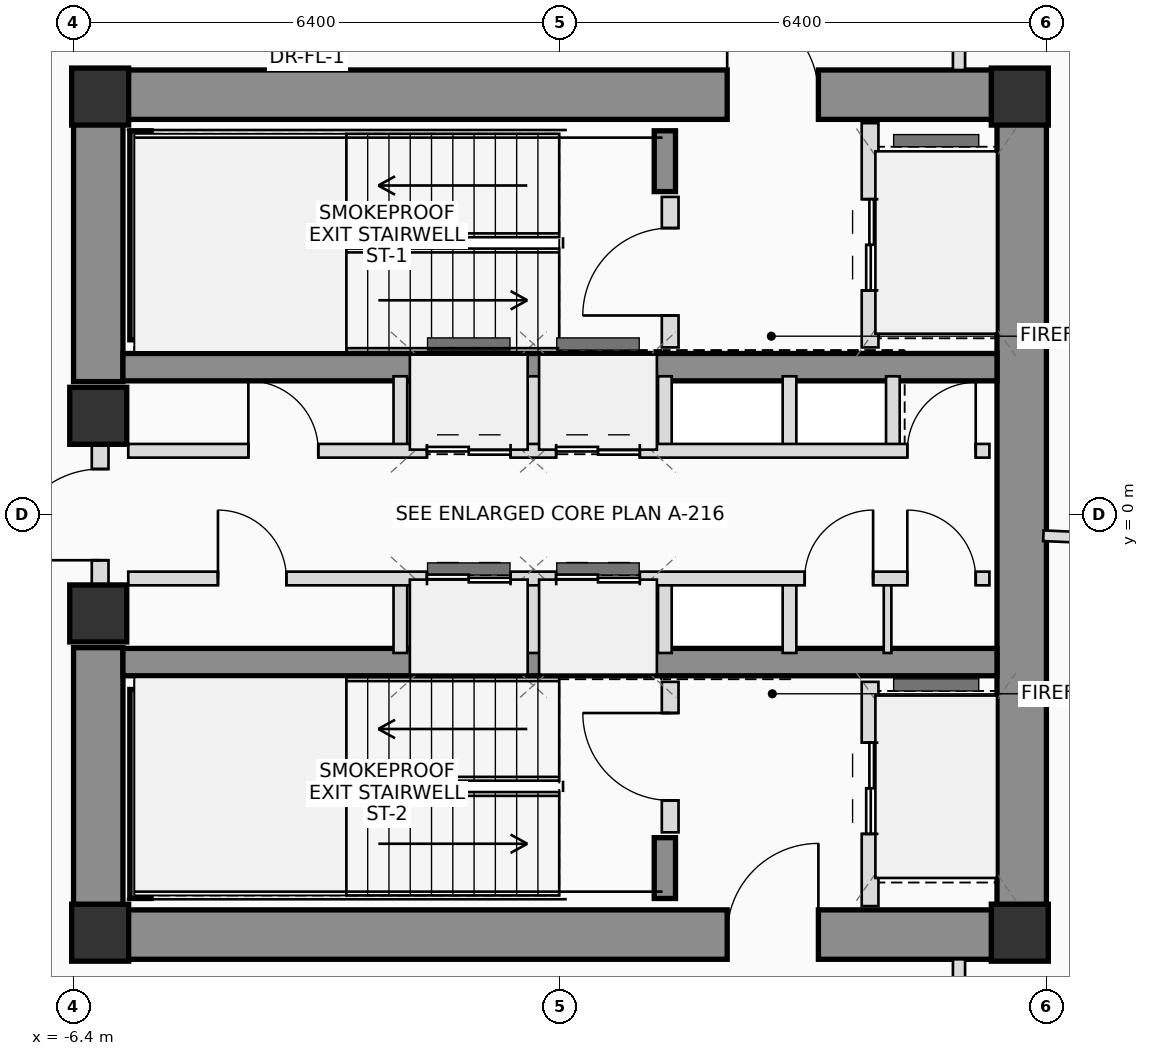
"""IFC4 building model, lengths in metres.
Left out: names, types, materials, properties, quantities, classifications, styles, units other than length and angle.
Written with IfcOpenShell. Run it as: python <this file> out.ifc"""

import sys

from ifc_helpers import new_model, si_unit, direction, frame, frame_2d, origin, origin_2d, place, context, subcontext, project, spatial, rectangle, extrude, source, transform, mapped, element, fill, save


model = new_model("IFC4")
c1 = context("Model", 3, precision=1e-05, world=origin(), true_north=direction((0.0, 1.0)))
c2 = subcontext(c1, "Body", "Model", "MODEL_VIEW")
j1 = project(units=[si_unit("LENGTHUNIT", "METRE"), si_unit("PLANEANGLEUNIT", "RADIAN")], contexts=[c1])
p1 = place(None, origin())
s1 = spatial("IfcSite", under=j1, at=p1, CompositionType="ELEMENT")
p2 = place(p1, origin())
s2 = spatial("IfcBuilding", under=s1, at=p2, CompositionType="ELEMENT")
p3 = place(p2, frame((0.0, 0.0, 176.0)))
s3 = spatial("IfcBuildingStorey", under=s2, at=p3, CompositionType="ELEMENT", Elevation=176.0)
m1 = source(origin(), c2, "Body", "SweptSolid", [
    extrude(rectangle(XDim=0.75, YDim=0.75, at=origin_2d()), origin(), (0.0, 0.0, 1.0), 3.45),
])
for number, where, z_axis, x_axis in (
    (1, (-6.05, -5.5, 0.0), (0.0, 0.0, 1.0), (1.0, 0.0, 0.0)),
    (2, (6.05, -5.5, 0.0), (0.0, 0.0, 1.0), (1.0, 0.0, 0.0)),
    (3, (6.05, 5.5, 0.0), (0.0, 0.0, 1.0), (1.0, 0.0, 0.0)),
    (4, (-6.05, 5.5, 0.0), (0.0, 0.0, 1.0), (1.0, 0.0, 0.0)),
):
    element("IfcColumn", number, at=place(p3, frame(where, z_axis=z_axis, x_axis=x_axis)), inside=s3, PredefinedType="COLUMN", context=c2, shape_type="MappedRepresentation", body=[
        mapped(m1, transform((0.0, 0.0, 0.0), scale=1.0)),
    ])
p4 = place(p3, frame((-6.4, 5.525, 0.0), z_axis=(0.0, 0.0, 1.0), x_axis=(1.0, 0.0, 0.0)))
e5 = element("IfcWall", 5, at=p4, inside=s3, PredefinedType="SHEAR", context=c2, shape_type="SweptSolid", body=[
    extrude(rectangle(XDim=12.8, YDim=0.65, at=frame_2d((6.4, 0.0))), origin(), (0.0, 0.0, 1.0), 3.45),
])
p5 = place(p4, frame((8.6, 0.0, 0.0)))
e6 = element("IfcOpeningElement", 6, at=p5, cuts=e5, PredefinedType="OPENING", context=c2, shape_type="SweptSolid", body=[
    extrude(rectangle(XDim=1.2, YDim=2.2, at=frame_2d((0.6, 1.1))), frame((0.0, 0.335, 0.0), z_axis=(0.0, -1.0, 0.0), x_axis=(1.0, 0.0, 0.0)), (0.0, 0.0, 1.0), 0.67),
])
p6 = place(p3, frame((-6.4, -5.525, 0.0), z_axis=(0.0, 0.0, 1.0), x_axis=(1.0, 0.0, 0.0)))
e7 = element("IfcWall", 7, at=p6, inside=s3, PredefinedType="SHEAR", context=c2, shape_type="SweptSolid", body=[
    extrude(rectangle(XDim=12.8, YDim=0.65, at=frame_2d((6.4, 0.0))), origin(), (0.0, 0.0, 1.0), 3.45),
])
p7 = place(p6, frame((8.6, 0.0, 0.0)))
e8 = element("IfcOpeningElement", 8, at=p7, cuts=e7, PredefinedType="OPENING", context=c2, shape_type="SweptSolid", body=[
    extrude(rectangle(XDim=1.2, YDim=2.2, at=frame_2d((0.6, 1.1))), frame((0.0, 0.335, 0.0), z_axis=(0.0, -1.0, 0.0), x_axis=(1.0, 0.0, 0.0)), (0.0, 0.0, 1.0), 0.67),
])
p8 = place(p3, frame((6.075, -5.2, 0.0), z_axis=(0.0, 0.0, 1.0), x_axis=(0.0, 1.0, 0.0)))
e9 = element("IfcWall", 9, at=p8, inside=s3, PredefinedType="SHEAR", context=c2, shape_type="SweptSolid", body=[
    extrude(rectangle(XDim=10.4, YDim=0.65, at=frame_2d((5.2, 0.0))), origin(), (0.0, 0.0, 1.0), 3.45),
])
for number, where, z_axis, x_axis in (
    (10, (-6.075, -5.2, 0.0), (0.0, 0.0, 1.0), (0.0, 1.0, 0.0)),
    (11, (-6.075, 1.75, 0.0), (0.0, 0.0, 1.0), (0.0, 1.0, 0.0)),
):
    element("IfcWall", number, at=place(p3, frame(where, z_axis=z_axis, x_axis=x_axis)), inside=s3, PredefinedType="SHEAR", context=c2, shape_type="SweptSolid", body=[
        extrude(rectangle(XDim=3.45, YDim=0.65, at=frame_2d((1.725, 0.0))), origin(), (0.0, 0.0, 1.0), 3.45),
    ])
for number, where, z_axis, x_axis in (
    (12, (-5.75, 1.94, 0.0), (0.0, 0.0, 1.0), (1.0, 0.0, 0.0)),
    (13, (-5.75, -1.94, 0.0), (0.0, 0.0, 1.0), (1.0, 0.0, 0.0)),
):
    element("IfcWall", number, at=place(p3, frame(where, z_axis=z_axis, x_axis=x_axis)), inside=s3, PredefinedType="SHEAR", context=c2, shape_type="SweptSolid", body=[
        extrude(rectangle(XDim=11.5, YDim=0.36, at=frame_2d((5.75, 0.0))), origin(), (0.0, 0.0, 1.0), 3.45),
    ])
p9 = place(p3, frame((-5.52, 2.3, 0.0), z_axis=(0.0, 0.0, 1.0), x_axis=(0.0, 1.0, 0.0)))
e14 = element("IfcWall", 14, at=p9, inside=s3, PredefinedType="SHEAR", context=c2, shape_type="SweptSolid", body=[
    extrude(rectangle(XDim=2.75, YDim=0.28, at=frame_2d((1.375, 0.0))), origin(), (0.0, 0.0, 1.0), 3.45),
])
p10 = place(p3, frame((1.38, 4.25, 0.0), z_axis=(0.0, 0.0, 1.0), x_axis=(0.0, 1.0, 0.0)))
e15 = element("IfcWall", 15, at=p10, inside=s3, PredefinedType="SHEAR", context=c2, shape_type="SweptSolid", body=[
    extrude(rectangle(XDim=0.8, YDim=0.28, at=frame_2d((0.4, 0.0))), origin(), (0.0, 0.0, 1.0), 3.45),
])
p11 = place(p3, frame((-5.52, -5.05, 0.0), z_axis=(0.0, 0.0, 1.0), x_axis=(0.0, 1.0, 0.0)))
e16 = element("IfcWall", 16, at=p11, inside=s3, PredefinedType="SHEAR", context=c2, shape_type="SweptSolid", body=[
    extrude(rectangle(XDim=2.75, YDim=0.28, at=frame_2d((1.375, 0.0))), origin(), (0.0, 0.0, 1.0), 3.45),
])
p12 = place(p3, frame((1.38, -5.05, 0.0), z_axis=(0.0, 0.0, 1.0), x_axis=(0.0, 1.0, 0.0)))
e17 = element("IfcWall", 17, at=p12, inside=s3, PredefinedType="SHEAR", context=c2, shape_type="SweptSolid", body=[
    extrude(rectangle(XDim=0.8, YDim=0.28, at=frame_2d((0.4, 0.0))), origin(), (0.0, 0.0, 1.0), 3.45),
])
for number, where, z_axis, x_axis in (
    (18, (-6.075, -1.3, 0.0), (0.0, 0.0, 1.0), (1.0, 0.0, 0.0)),
    (19, (-6.075, 1.3, 0.0), (0.0, 0.0, 1.0), (1.0, 0.0, 0.0)),
):
    element("IfcColumn", number, at=place(p3, frame(where, z_axis=z_axis, x_axis=x_axis)), inside=s3, PredefinedType="COLUMN", context=c2, shape_type="MappedRepresentation", body=[
        mapped(m1, transform((0.0, 0.0, 0.0), scale=1.0)),
    ])
p13 = place(p3, frame((-6.05, -0.95, 0.0), z_axis=(0.0, 0.0, 1.0), x_axis=(0.0, 1.0, 0.0)))
e20 = element("IfcWall", 20, at=p13, inside=s3, PredefinedType="PLUMBINGWALL", context=c2, shape_type="SweptSolid", body=[
    extrude(rectangle(XDim=1.9, YDim=0.22, at=frame_2d((0.95, 0.0))), origin(), (0.0, 0.0, 1.0), 2.23),
])
p14 = place(p13, frame((0.35, 0.0, 0.0)))
e21 = element("IfcOpeningElement", 21, at=p14, cuts=e20, PredefinedType="OPENING", context=c2, shape_type="SweptSolid", body=[
    extrude(rectangle(XDim=1.2, YDim=2.2, at=frame_2d((0.6, 1.1))), frame((0.0, 0.12, 0.0), z_axis=(0.0, -1.0, 0.0), x_axis=(1.0, 0.0, 0.0)), (0.0, 0.0, 1.0), 0.24),
])
p15 = place(p3, frame((1.45, 2.2, 0.0), z_axis=(0.0, 0.0, 1.0), x_axis=(0.0, 1.0, 0.0)))
e22 = element("IfcWall", 22, at=p15, inside=s3, PredefinedType="PLUMBINGWALL", context=c2, shape_type="SweptSolid", body=[
    extrude(rectangle(XDim=1.98, YDim=0.22, at=frame_2d((0.99, 0.0))), origin(), (0.0, 0.0, 1.0), 3.25),
])
p16 = place(p15, frame((0.42, 0.0, 0.0)))
e23 = element("IfcOpeningElement", 23, at=p16, cuts=e22, PredefinedType="OPENING", context=c2, shape_type="SweptSolid", body=[
    extrude(rectangle(XDim=1.15, YDim=2.15, at=frame_2d((0.575, 1.075))), frame((0.0, 0.12, 0.0), z_axis=(0.0, -1.0, 0.0), x_axis=(1.0, 0.0, 0.0)), (0.0, 0.0, 1.0), 0.24),
])
p17 = place(p3, frame((4.08, 2.2, 0.0), z_axis=(0.0, 0.0, 1.0), x_axis=(0.0, 1.0, 0.0)))
e24 = element("IfcWall", 24, at=p17, inside=s3, PredefinedType="PLUMBINGWALL", context=c2, shape_type="SweptSolid", body=[
    extrude(rectangle(XDim=2.95, YDim=0.22, at=frame_2d((1.475, 0.0))), origin(), (0.0, 0.0, 1.0), 3.25),
])
p18 = place(p17, frame((0.75, 0.0, 0.0)))
e25 = element("IfcOpeningElement", 25, at=p18, cuts=e24, PredefinedType="OPENING", context=c2, shape_type="SweptSolid", body=[
    extrude(rectangle(XDim=1.2, YDim=2.25, at=frame_2d((0.6, 1.125))), frame((0.0, 0.12, 0.0), z_axis=(0.0, -1.0, 0.0), x_axis=(1.0, 0.0, 0.0)), (0.0, 0.0, 1.0), 0.24),
])
p19 = place(p3, frame((1.45, -4.18, 0.0), z_axis=(0.0, 0.0, 1.0), x_axis=(0.0, 1.0, 0.0)))
e26 = element("IfcWall", 26, at=p19, inside=s3, PredefinedType="PLUMBINGWALL", context=c2, shape_type="SweptSolid", body=[
    extrude(rectangle(XDim=1.98, YDim=0.22, at=frame_2d((0.99, 0.0))), origin(), (0.0, 0.0, 1.0), 3.25),
])
p20 = place(p19, frame((0.42, 0.0, 0.0)))
e27 = element("IfcOpeningElement", 27, at=p20, cuts=e26, PredefinedType="OPENING", context=c2, shape_type="SweptSolid", body=[
    extrude(rectangle(XDim=1.15, YDim=2.15, at=frame_2d((0.575, 1.075))), frame((0.0, 0.12, 0.0), z_axis=(0.0, -1.0, 0.0), x_axis=(1.0, 0.0, 0.0)), (0.0, 0.0, 1.0), 0.24),
])
p21 = place(p3, frame((4.08, -5.15, 0.0), z_axis=(0.0, 0.0, 1.0), x_axis=(0.0, 1.0, 0.0)))
e28 = element("IfcWall", 28, at=p21, inside=s3, PredefinedType="PLUMBINGWALL", context=c2, shape_type="SweptSolid", body=[
    extrude(rectangle(XDim=2.95, YDim=0.22, at=frame_2d((1.475, 0.0))), origin(), (0.0, 0.0, 1.0), 3.25),
])
p22 = place(p21, frame((0.95, 0.0, 0.0)))
e29 = element("IfcOpeningElement", 29, at=p22, cuts=e28, PredefinedType="OPENING", context=c2, shape_type="SweptSolid", body=[
    extrude(rectangle(XDim=1.2, YDim=2.25, at=frame_2d((0.6, 1.125))), frame((0.0, 0.12, 0.0), z_axis=(0.0, -1.0, 0.0), x_axis=(1.0, 0.0, 0.0)), (0.0, 0.0, 1.0), 0.24),
])
for number, where, z_axis, x_axis in (
    (30, (-2.1, 0.84, 0.0), (0.0, 0.0, 1.0), (0.0, 1.0, 0.0)),
    (31, (-2.1, -1.82, 0.0), (0.0, 0.0, 1.0), (0.0, 1.0, 0.0)),
    (32, (-0.35, 0.84, 0.0), (0.0, 0.0, 1.0), (0.0, 1.0, 0.0)),
    (33, (-0.35, -1.82, 0.0), (0.0, 0.0, 1.0), (0.0, 1.0, 0.0)),
    (34, (1.38, 0.84, 0.0), (0.0, 0.0, 1.0), (0.0, 1.0, 0.0)),
    (35, (1.38, -1.82, 0.0), (0.0, 0.0, 1.0), (0.0, 1.0, 0.0)),
    (36, (3.02, 0.84, 0.0), (0.0, 0.0, 1.0), (0.0, 1.0, 0.0)),
    (37, (4.38, 0.84, 0.0), (0.0, 0.0, 1.0), (0.0, 1.0, 0.0)),
    (38, (3.02, -1.82, 0.0), (0.0, 0.0, 1.0), (0.0, 1.0, 0.0)),
):
    element("IfcWall", number, at=place(p3, frame(where, z_axis=z_axis, x_axis=x_axis)), inside=s3, PredefinedType="PLUMBINGWALL", context=c2, shape_type="SweptSolid", body=[
        extrude(rectangle(XDim=0.98, YDim=0.18, at=frame_2d((0.49, 0.0))), origin(), (0.0, 0.0, 1.0), 3.25),
    ])
p23 = place(p3, frame((4.31, -1.82, 0.0), z_axis=(0.0, 0.0, 1.0), x_axis=(0.0, 1.0, 0.0)))
e39 = element("IfcWall", 39, at=p23, inside=s3, PredefinedType="PARTITIONING", context=c2, shape_type="SweptSolid", body=[
    extrude(rectangle(XDim=0.98, YDim=0.1, at=frame_2d((0.49, 0.0))), origin(), (0.0, 0.0, 1.0), 3.25),
])
p24 = place(p3, frame((-5.68, 0.84, 0.0), z_axis=(0.0, 0.0, 1.0), x_axis=(1.0, 0.0, 0.0)))
e40 = element("IfcWall", 40, at=p24, inside=s3, PredefinedType="PLUMBINGWALL", context=c2, shape_type="SweptSolid", body=[
    extrude(rectangle(XDim=11.33, YDim=0.18, at=frame_2d((5.665, 0.0))), origin(), (0.0, 0.0, 1.0), 3.25),
])
p25 = place(p24, frame((1.58, 0.0, 0.0)))
e41 = element("IfcOpeningElement", 41, at=p25, cuts=e40, PredefinedType="OPENING", context=c2, shape_type="SweptSolid", body=[
    extrude(rectangle(XDim=0.92, YDim=2.1, at=frame_2d((0.46, 1.05))), frame((0.0, 0.1, 0.0), z_axis=(0.0, -1.0, 0.0), x_axis=(1.0, 0.0, 0.0)), (0.0, 0.0, 1.0), 0.2),
])
p26 = place(p24, frame((3.93, 0.0, 0.0)))
e42 = element("IfcOpeningElement", 42, at=p26, cuts=e40, PredefinedType="OPENING", context=c2, shape_type="SweptSolid", body=[
    extrude(rectangle(XDim=1.1, YDim=2.2, at=frame_2d((0.55, 1.1))), frame((0.0, 0.1, 0.0), z_axis=(0.0, -1.0, 0.0), x_axis=(1.0, 0.0, 0.0)), (0.0, 0.0, 1.0), 0.2),
])
p27 = place(p24, frame((5.63, 0.0, 0.0)))
e43 = element("IfcOpeningElement", 43, at=p27, cuts=e40, PredefinedType="OPENING", context=c2, shape_type="SweptSolid", body=[
    extrude(rectangle(XDim=1.1, YDim=2.2, at=frame_2d((0.55, 1.1))), frame((0.0, 0.1, 0.0), z_axis=(0.0, -1.0, 0.0), x_axis=(1.0, 0.0, 0.0)), (0.0, 0.0, 1.0), 0.2),
])
p28 = place(p24, frame((10.25, 0.0, 0.0)))
e44 = element("IfcOpeningElement", 44, at=p28, cuts=e40, PredefinedType="OPENING", context=c2, shape_type="SweptSolid", body=[
    extrude(rectangle(XDim=0.9, YDim=2.05, at=frame_2d((0.45, 1.025))), frame((0.0, 0.1, 0.0), z_axis=(0.0, -1.0, 0.0), x_axis=(1.0, 0.0, 0.0)), (0.0, 0.0, 1.0), 0.2),
])
p29 = place(p3, frame((-5.68, -0.84, 0.0), z_axis=(0.0, 0.0, 1.0), x_axis=(1.0, 0.0, 0.0)))
e45 = element("IfcWall", 45, at=p29, inside=s3, PredefinedType="PLUMBINGWALL", context=c2, shape_type="SweptSolid", body=[
    extrude(rectangle(XDim=11.33, YDim=0.18, at=frame_2d((5.665, 0.0))), origin(), (0.0, 0.0, 1.0), 3.25),
])
p30 = place(p29, frame((1.18, 0.0, 0.0)))
e46 = element("IfcOpeningElement", 46, at=p30, cuts=e45, PredefinedType="OPENING", context=c2, shape_type="SweptSolid", body=[
    extrude(rectangle(XDim=0.9, YDim=2.05, at=frame_2d((0.45, 1.025))), frame((0.0, 0.1, 0.0), z_axis=(0.0, -1.0, 0.0), x_axis=(1.0, 0.0, 0.0)), (0.0, 0.0, 1.0), 0.2),
])
p31 = place(p29, frame((3.93, 0.0, 0.0)))
e47 = element("IfcOpeningElement", 47, at=p31, cuts=e45, PredefinedType="OPENING", context=c2, shape_type="SweptSolid", body=[
    extrude(rectangle(XDim=1.1, YDim=2.2, at=frame_2d((0.55, 1.1))), frame((0.0, 0.1, 0.0), z_axis=(0.0, -1.0, 0.0), x_axis=(1.0, 0.0, 0.0)), (0.0, 0.0, 1.0), 0.2),
])
p32 = place(p29, frame((5.63, 0.0, 0.0)))
e48 = element("IfcOpeningElement", 48, at=p32, cuts=e45, PredefinedType="OPENING", context=c2, shape_type="SweptSolid", body=[
    extrude(rectangle(XDim=1.1, YDim=2.2, at=frame_2d((0.55, 1.1))), frame((0.0, 0.1, 0.0), z_axis=(0.0, -1.0, 0.0), x_axis=(1.0, 0.0, 0.0)), (0.0, 0.0, 1.0), 0.2),
])
p33 = place(p29, frame((8.9, 0.0, 0.0)))
e49 = element("IfcOpeningElement", 49, at=p33, cuts=e45, PredefinedType="OPENING", context=c2, shape_type="SweptSolid", body=[
    extrude(rectangle(XDim=0.9, YDim=2.05, at=frame_2d((0.45, 1.025))), frame((0.0, 0.1, 0.0), z_axis=(0.0, -1.0, 0.0), x_axis=(1.0, 0.0, 0.0)), (0.0, 0.0, 1.0), 0.2),
])
p34 = place(p29, frame((10.25, 0.0, 0.0)))
e50 = element("IfcOpeningElement", 50, at=p34, cuts=e45, PredefinedType="OPENING", context=c2, shape_type="SweptSolid", body=[
    extrude(rectangle(XDim=0.9, YDim=2.05, at=frame_2d((0.45, 1.025))), frame((0.0, 0.1, 0.0), z_axis=(0.0, -1.0, 0.0), x_axis=(1.0, 0.0, 0.0)), (0.0, 0.0, 1.0), 0.2),
])
for number, where, z_axis, x_axis in (
    (51, (5.25, 7.55, 0.0), (0.0, 0.0, 1.0), (0.0, -1.0, 0.0)),
    (52, (5.25, -5.85, 0.0), (0.0, 0.0, 1.0), (0.0, -1.0, 0.0)),
):
    element("IfcWall", number, at=place(p3, frame(where, z_axis=z_axis, x_axis=x_axis)), inside=s3, PredefinedType="PARTITIONING", context=c2, shape_type="SweptSolid", body=[
        extrude(rectangle(XDim=1.7, YDim=0.16, at=frame_2d((0.85, 0.0))), origin(), (0.0, 0.0, 1.0), 3.25),
    ])
p35 = place(p3, frame((6.36, -0.278, 0.0), z_axis=(0.0, 0.0, 1.0), x_axis=(0.999047983793, -0.043624833281, 0.0)))
e53 = element("IfcWall", 53, at=p35, inside=s3, PredefinedType="PARTITIONING", context=c2, shape_type="SweptSolid", body=[
    extrude(rectangle(XDim=6.833, YDim=0.14, at=frame_2d((3.417, 0.0))), origin(), (0.0, 0.0, 1.0), 2.605),
])
p36 = place(p5, origin())
e54 = element("IfcDoor", 54, at=p36, inside=s3, OperationType="SINGLE_SWING_LEFT", PredefinedType="DOOR", context=c2, shape_type="SweptSolid", body=[
    extrude(rectangle(XDim=1.2, YDim=2.2, at=frame_2d((0.6, 1.1))), frame((0.0, 0.025, 0.0), z_axis=(0.0, -1.0, 0.0), x_axis=(1.0, 0.0, 0.0)), (0.0, 0.0, 1.0), 0.05),
])
fill(e6, e54)
p37 = place(p7, origin())
e55 = element("IfcDoor", 55, at=p37, inside=s3, OperationType="SINGLE_SWING_RIGHT", PredefinedType="DOOR", context=c2, shape_type="SweptSolid", body=[
    extrude(rectangle(XDim=1.2, YDim=2.2, at=frame_2d((0.6, 1.1))), frame((0.0, 0.025, 0.0), z_axis=(0.0, -1.0, 0.0), x_axis=(1.0, 0.0, 0.0)), (0.0, 0.0, 1.0), 0.05),
])
fill(e8, e55)
p38 = place(p14, origin())
e56 = element("IfcDoor", 56, at=p38, inside=s3, OperationType="SINGLE_SWING_LEFT", PredefinedType="DOOR", context=c2, shape_type="SweptSolid", body=[
    extrude(rectangle(XDim=1.2, YDim=2.2, at=frame_2d((0.6, 1.1))), frame((0.0, 0.025, 0.0), z_axis=(0.0, -1.0, 0.0), x_axis=(1.0, 0.0, 0.0)), (0.0, 0.0, 1.0), 0.05),
])
fill(e21, e56)
p39 = place(p16, origin())
e57 = element("IfcDoor", 57, at=p39, inside=s3, OperationType="SINGLE_SWING_LEFT", PredefinedType="DOOR", context=c2, shape_type="SweptSolid", body=[
    extrude(rectangle(XDim=1.15, YDim=2.15, at=frame_2d((0.575, 1.075))), frame((0.0, 0.025, 0.0), z_axis=(0.0, -1.0, 0.0), x_axis=(1.0, 0.0, 0.0)), (0.0, 0.0, 1.0), 0.05),
])
fill(e23, e57)
p40 = place(p18, origin())
e58 = element("IfcDoor", 58, at=p40, inside=s3, OperationType="DOUBLE_DOOR_SLIDING", PredefinedType="DOOR", context=c2, shape_type="SweptSolid", body=[
    extrude(rectangle(XDim=1.2, YDim=2.25, at=frame_2d((0.6, 1.125))), frame((0.0, 0.025, 0.0), z_axis=(0.0, -1.0, 0.0), x_axis=(1.0, 0.0, 0.0)), (0.0, 0.0, 1.0), 0.05),
])
fill(e25, e58)
p41 = place(p20, origin())
e59 = element("IfcDoor", 59, at=p41, inside=s3, OperationType="SINGLE_SWING_RIGHT", PredefinedType="DOOR", context=c2, shape_type="SweptSolid", body=[
    extrude(rectangle(XDim=1.15, YDim=2.15, at=frame_2d((0.575, 1.075))), frame((0.0, 0.025, 0.0), z_axis=(0.0, -1.0, 0.0), x_axis=(1.0, 0.0, 0.0)), (0.0, 0.0, 1.0), 0.05),
])
fill(e27, e59)
p42 = place(p22, origin())
e60 = element("IfcDoor", 60, at=p42, inside=s3, OperationType="DOUBLE_DOOR_SLIDING", PredefinedType="DOOR", context=c2, shape_type="SweptSolid", body=[
    extrude(rectangle(XDim=1.2, YDim=2.25, at=frame_2d((0.6, 1.125))), frame((0.0, 0.025, 0.0), z_axis=(0.0, -1.0, 0.0), x_axis=(1.0, 0.0, 0.0)), (0.0, 0.0, 1.0), 0.05),
])
fill(e29, e60)
p43 = place(p25, origin())
e61 = element("IfcDoor", 61, at=p43, inside=s3, OperationType="SINGLE_SWING_LEFT", PredefinedType="DOOR", context=c2, shape_type="SweptSolid", body=[
    extrude(rectangle(XDim=0.92, YDim=2.1, at=frame_2d((0.46, 1.05))), frame((0.0, 0.025, 0.0), z_axis=(0.0, -1.0, 0.0), x_axis=(1.0, 0.0, 0.0)), (0.0, 0.0, 1.0), 0.05),
])
fill(e41, e61)
p44 = place(p26, origin())
e62 = element("IfcDoor", 62, at=p44, inside=s3, OperationType="DOUBLE_DOOR_SLIDING", PredefinedType="DOOR", context=c2, shape_type="SweptSolid", body=[
    extrude(rectangle(XDim=1.1, YDim=2.2, at=frame_2d((0.55, 1.1))), frame((0.0, 0.025, 0.0), z_axis=(0.0, -1.0, 0.0), x_axis=(1.0, 0.0, 0.0)), (0.0, 0.0, 1.0), 0.05),
])
fill(e42, e62)
p45 = place(p27, origin())
e63 = element("IfcDoor", 63, at=p45, inside=s3, OperationType="DOUBLE_DOOR_SLIDING", PredefinedType="DOOR", context=c2, shape_type="SweptSolid", body=[
    extrude(rectangle(XDim=1.1, YDim=2.2, at=frame_2d((0.55, 1.1))), frame((0.0, 0.025, 0.0), z_axis=(0.0, -1.0, 0.0), x_axis=(1.0, 0.0, 0.0)), (0.0, 0.0, 1.0), 0.05),
])
fill(e43, e63)
p46 = place(p28, origin())
e64 = element("IfcDoor", 64, at=p46, inside=s3, OperationType="SINGLE_SWING_RIGHT", PredefinedType="DOOR", context=c2, shape_type="SweptSolid", body=[
    extrude(rectangle(XDim=0.9, YDim=2.05, at=frame_2d((0.45, 1.025))), frame((0.0, 0.025, 0.0), z_axis=(0.0, -1.0, 0.0), x_axis=(1.0, 0.0, 0.0)), (0.0, 0.0, 1.0), 0.05),
])
fill(e44, e64)
p47 = place(p30, origin())
e65 = element("IfcDoor", 65, at=p47, inside=s3, OperationType="SINGLE_SWING_LEFT", PredefinedType="DOOR", context=c2, shape_type="SweptSolid", body=[
    extrude(rectangle(XDim=0.9, YDim=2.05, at=frame_2d((0.45, 1.025))), frame((0.0, 0.025, 0.0), z_axis=(0.0, -1.0, 0.0), x_axis=(1.0, 0.0, 0.0)), (0.0, 0.0, 1.0), 0.05),
])
fill(e46, e65)
p48 = place(p31, origin())
e66 = element("IfcDoor", 66, at=p48, inside=s3, OperationType="DOUBLE_DOOR_SLIDING", PredefinedType="DOOR", context=c2, shape_type="SweptSolid", body=[
    extrude(rectangle(XDim=1.1, YDim=2.2, at=frame_2d((0.55, 1.1))), frame((0.0, 0.025, 0.0), z_axis=(0.0, -1.0, 0.0), x_axis=(1.0, 0.0, 0.0)), (0.0, 0.0, 1.0), 0.05),
])
fill(e47, e66)
p49 = place(p32, origin())
e67 = element("IfcDoor", 67, at=p49, inside=s3, OperationType="DOUBLE_DOOR_SLIDING", PredefinedType="DOOR", context=c2, shape_type="SweptSolid", body=[
    extrude(rectangle(XDim=1.1, YDim=2.2, at=frame_2d((0.55, 1.1))), frame((0.0, 0.025, 0.0), z_axis=(0.0, -1.0, 0.0), x_axis=(1.0, 0.0, 0.0)), (0.0, 0.0, 1.0), 0.05),
])
fill(e48, e67)
p50 = place(p33, origin())
e68 = element("IfcDoor", 68, at=p50, inside=s3, OperationType="SINGLE_SWING_RIGHT", PredefinedType="DOOR", context=c2, shape_type="SweptSolid", body=[
    extrude(rectangle(XDim=0.9, YDim=2.05, at=frame_2d((0.45, 1.025))), frame((0.0, 0.025, 0.0), z_axis=(0.0, -1.0, 0.0), x_axis=(1.0, 0.0, 0.0)), (0.0, 0.0, 1.0), 0.05),
])
fill(e49, e68)
p51 = place(p34, origin())
e69 = element("IfcDoor", 69, at=p51, inside=s3, OperationType="SINGLE_SWING_LEFT", PredefinedType="DOOR", context=c2, shape_type="SweptSolid", body=[
    extrude(rectangle(XDim=0.9, YDim=2.05, at=frame_2d((0.45, 1.025))), frame((0.0, 0.025, 0.0), z_axis=(0.0, -1.0, 0.0), x_axis=(1.0, 0.0, 0.0)), (0.0, 0.0, 1.0), 0.05),
])
fill(e50, e69)
save(model, sys.argv[1])
